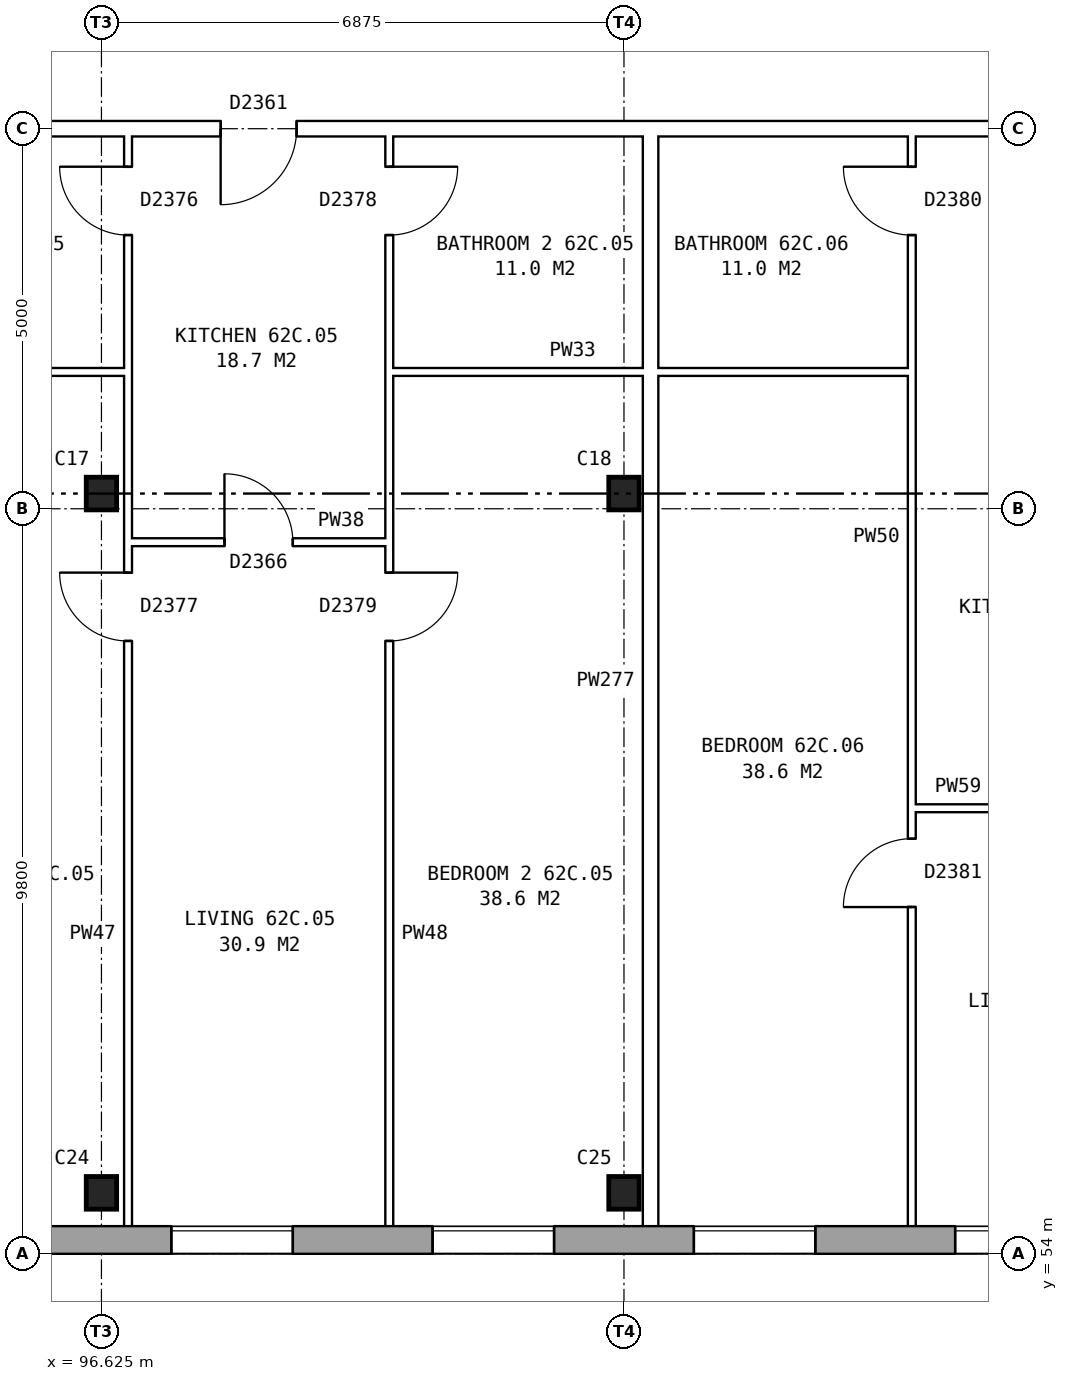
"""IFC4 building model, lengths in metres.
Left out: names, types, materials, properties, quantities, classifications, styles, units other than length and angle.
Written with IfcOpenShell. Run it as: python <this file> out.ifc"""

import sys

from ifc_helpers import new_model, si_unit, direction, frame, frame_2d, origin, origin_2d, place, context, subcontext, project, spatial, rectangle, i_section, extrude, element, fill, save


model = new_model("IFC4")
c1 = context("Model", 3, precision=1e-05, world=origin(), true_north=direction((0.0, 1.0)))
c2 = subcontext(c1, "Body", "Model", "MODEL_VIEW")
j1 = project(units=[si_unit("LENGTHUNIT", "METRE"), si_unit("PLANEANGLEUNIT", "RADIAN")], contexts=[c1])
p1 = place(None, origin())
s1 = spatial("IfcSite", under=j1, at=p1, CompositionType="ELEMENT")
p2 = place(p1, origin())
s2 = spatial("IfcBuilding", under=s1, at=p2, CompositionType="ELEMENT")
p3 = place(p2, frame((0.0, 0.0, 221.4)))
s3 = spatial("IfcBuildingStorey", under=s2, at=p3, CompositionType="ELEMENT", Elevation=221.4)
for number, where, z_axis, x_axis in (
    (1, (96.625, 54.8, 0.0), (0.0, 0.0, 1.0), (1.0, 0.0, 0.0)),
    (2, (103.5, 54.8, 0.0), (0.0, 0.0, 1.0), (1.0, 0.0, 0.0)),
    (3, (96.625, 64.0, 0.0), (0.0, 0.0, 1.0), (1.0, 0.0, 0.0)),
    (4, (103.5, 64.0, 0.0), (0.0, 0.0, 1.0), (1.0, 0.0, 0.0)),
):
    element("IfcColumn", number, at=place(p3, frame(where, z_axis=z_axis, x_axis=x_axis)), inside=s3, PredefinedType="COLUMN", context=c2, shape_type="SweptSolid", body=[
        extrude(i_section(OverallWidth=0.4, OverallDepth=0.43, WebThickness=0.04, FlangeThickness=0.04, at=origin_2d()), origin(), (0.0, 0.0, 1.0), 2.85),
    ])
p4 = place(p3, frame((75.95, 54.18, 0.0), z_axis=(0.0, 0.0, 1.0), x_axis=(1.0, 0.0, 0.0)))
e5 = element("IfcWall", 5, at=p4, inside=s3, PredefinedType="STANDARD", context=c2, shape_type="SweptSolid", body=[
    extrude(rectangle(XDim=55.1, YDim=0.36, at=frame_2d((27.55, 0.0))), origin(), (0.0, 0.0, 1.0), 2.85),
])
p5 = place(p4, frame((0.969, 0.0, 0.8)))
e6 = element("IfcOpeningElement", 6, at=p5, cuts=e5, PredefinedType="OPENING", context=c2, shape_type="SweptSolid", body=[
    extrude(rectangle(XDim=1.6, YDim=1.8, at=frame_2d((0.8, 0.9))), frame((0.0, 0.19, 0.0), z_axis=(0.0, -1.0, 0.0), x_axis=(1.0, 0.0, 0.0)), (0.0, 0.0, 1.0), 0.38),
])
p6 = place(p4, frame((4.406, 0.0, 0.8)))
e7 = element("IfcOpeningElement", 7, at=p6, cuts=e5, PredefinedType="OPENING", context=c2, shape_type="SweptSolid", body=[
    extrude(rectangle(XDim=1.6, YDim=1.8, at=frame_2d((0.8, 0.9))), frame((0.0, 0.19, 0.0), z_axis=(0.0, -1.0, 0.0), x_axis=(1.0, 0.0, 0.0)), (0.0, 0.0, 1.0), 0.38),
])
p7 = place(p4, frame((7.844, 0.0, 0.8)))
e8 = element("IfcOpeningElement", 8, at=p7, cuts=e5, PredefinedType="OPENING", context=c2, shape_type="SweptSolid", body=[
    extrude(rectangle(XDim=1.6, YDim=1.8, at=frame_2d((0.8, 0.9))), frame((0.0, 0.19, 0.0), z_axis=(0.0, -1.0, 0.0), x_axis=(1.0, 0.0, 0.0)), (0.0, 0.0, 1.0), 0.38),
])
p8 = place(p4, frame((11.281, 0.0, 0.8)))
e9 = element("IfcOpeningElement", 9, at=p8, cuts=e5, PredefinedType="OPENING", context=c2, shape_type="SweptSolid", body=[
    extrude(rectangle(XDim=1.6, YDim=1.8, at=frame_2d((0.8, 0.9))), frame((0.0, 0.19, 0.0), z_axis=(0.0, -1.0, 0.0), x_axis=(1.0, 0.0, 0.0)), (0.0, 0.0, 1.0), 0.38),
])
p9 = place(p4, frame((14.719, 0.0, 0.8)))
e10 = element("IfcOpeningElement", 10, at=p9, cuts=e5, PredefinedType="OPENING", context=c2, shape_type="SweptSolid", body=[
    extrude(rectangle(XDim=1.6, YDim=1.8, at=frame_2d((0.8, 0.9))), frame((0.0, 0.19, 0.0), z_axis=(0.0, -1.0, 0.0), x_axis=(1.0, 0.0, 0.0)), (0.0, 0.0, 1.0), 0.38),
])
p10 = place(p4, frame((18.156, 0.0, 0.8)))
e11 = element("IfcOpeningElement", 11, at=p10, cuts=e5, PredefinedType="OPENING", context=c2, shape_type="SweptSolid", body=[
    extrude(rectangle(XDim=1.6, YDim=1.8, at=frame_2d((0.8, 0.9))), frame((0.0, 0.19, 0.0), z_axis=(0.0, -1.0, 0.0), x_axis=(1.0, 0.0, 0.0)), (0.0, 0.0, 1.0), 0.38),
])
p11 = place(p4, frame((21.594, 0.0, 0.8)))
e12 = element("IfcOpeningElement", 12, at=p11, cuts=e5, PredefinedType="OPENING", context=c2, shape_type="SweptSolid", body=[
    extrude(rectangle(XDim=1.6, YDim=1.8, at=frame_2d((0.8, 0.9))), frame((0.0, 0.19, 0.0), z_axis=(0.0, -1.0, 0.0), x_axis=(1.0, 0.0, 0.0)), (0.0, 0.0, 1.0), 0.38),
])
p12 = place(p4, frame((25.031, 0.0, 0.8)))
e13 = element("IfcOpeningElement", 13, at=p12, cuts=e5, PredefinedType="OPENING", context=c2, shape_type="SweptSolid", body=[
    extrude(rectangle(XDim=1.6, YDim=1.8, at=frame_2d((0.8, 0.9))), frame((0.0, 0.19, 0.0), z_axis=(0.0, -1.0, 0.0), x_axis=(1.0, 0.0, 0.0)), (0.0, 0.0, 1.0), 0.38),
])
p13 = place(p4, frame((28.469, 0.0, 0.8)))
e14 = element("IfcOpeningElement", 14, at=p13, cuts=e5, PredefinedType="OPENING", context=c2, shape_type="SweptSolid", body=[
    extrude(rectangle(XDim=1.6, YDim=1.8, at=frame_2d((0.8, 0.9))), frame((0.0, 0.19, 0.0), z_axis=(0.0, -1.0, 0.0), x_axis=(1.0, 0.0, 0.0)), (0.0, 0.0, 1.0), 0.38),
])
p14 = place(p4, frame((31.906, 0.0, 0.8)))
e15 = element("IfcOpeningElement", 15, at=p14, cuts=e5, PredefinedType="OPENING", context=c2, shape_type="SweptSolid", body=[
    extrude(rectangle(XDim=1.6, YDim=1.8, at=frame_2d((0.8, 0.9))), frame((0.0, 0.19, 0.0), z_axis=(0.0, -1.0, 0.0), x_axis=(1.0, 0.0, 0.0)), (0.0, 0.0, 1.0), 0.38),
])
p15 = place(p4, frame((35.344, 0.0, 0.8)))
e16 = element("IfcOpeningElement", 16, at=p15, cuts=e5, PredefinedType="OPENING", context=c2, shape_type="SweptSolid", body=[
    extrude(rectangle(XDim=1.6, YDim=1.8, at=frame_2d((0.8, 0.9))), frame((0.0, 0.19, 0.0), z_axis=(0.0, -1.0, 0.0), x_axis=(1.0, 0.0, 0.0)), (0.0, 0.0, 1.0), 0.38),
])
p16 = place(p4, frame((38.781, 0.0, 0.8)))
e17 = element("IfcOpeningElement", 17, at=p16, cuts=e5, PredefinedType="OPENING", context=c2, shape_type="SweptSolid", body=[
    extrude(rectangle(XDim=1.6, YDim=1.8, at=frame_2d((0.8, 0.9))), frame((0.0, 0.19, 0.0), z_axis=(0.0, -1.0, 0.0), x_axis=(1.0, 0.0, 0.0)), (0.0, 0.0, 1.0), 0.38),
])
p17 = place(p4, frame((42.219, 0.0, 0.8)))
e18 = element("IfcOpeningElement", 18, at=p17, cuts=e5, PredefinedType="OPENING", context=c2, shape_type="SweptSolid", body=[
    extrude(rectangle(XDim=1.6, YDim=1.8, at=frame_2d((0.8, 0.9))), frame((0.0, 0.19, 0.0), z_axis=(0.0, -1.0, 0.0), x_axis=(1.0, 0.0, 0.0)), (0.0, 0.0, 1.0), 0.38),
])
p18 = place(p4, frame((45.656, 0.0, 0.8)))
e19 = element("IfcOpeningElement", 19, at=p18, cuts=e5, PredefinedType="OPENING", context=c2, shape_type="SweptSolid", body=[
    extrude(rectangle(XDim=1.6, YDim=1.8, at=frame_2d((0.8, 0.9))), frame((0.0, 0.19, 0.0), z_axis=(0.0, -1.0, 0.0), x_axis=(1.0, 0.0, 0.0)), (0.0, 0.0, 1.0), 0.38),
])
p19 = place(p4, frame((49.094, 0.0, 0.8)))
e20 = element("IfcOpeningElement", 20, at=p19, cuts=e5, PredefinedType="OPENING", context=c2, shape_type="SweptSolid", body=[
    extrude(rectangle(XDim=1.6, YDim=1.8, at=frame_2d((0.8, 0.9))), frame((0.0, 0.19, 0.0), z_axis=(0.0, -1.0, 0.0), x_axis=(1.0, 0.0, 0.0)), (0.0, 0.0, 1.0), 0.38),
])
p20 = place(p4, frame((52.531, 0.0, 0.8)))
e21 = element("IfcOpeningElement", 21, at=p20, cuts=e5, PredefinedType="OPENING", context=c2, shape_type="SweptSolid", body=[
    extrude(rectangle(XDim=1.6, YDim=1.8, at=frame_2d((0.8, 0.9))), frame((0.0, 0.19, 0.0), z_axis=(0.0, -1.0, 0.0), x_axis=(1.0, 0.0, 0.0)), (0.0, 0.0, 1.0), 0.38),
])
p21 = place(p3, frame((107.287, 59.86, 0.0), z_axis=(0.0, 0.0, 1.0), x_axis=(1.0, 0.0, 0.0)))
e22 = element("IfcWall", 22, at=p21, inside=s3, PredefinedType="PARTITIONING", context=c2, shape_type="SweptSolid", body=[
    extrude(rectangle(XDim=3.338, YDim=0.1, at=frame_2d((1.669, 0.0))), origin(), (0.0, 0.0, 1.0), 2.85),
])
p22 = place(p21, frame((1.219, 0.0, 0.0)))
e23 = element("IfcOpeningElement", 23, at=p22, cuts=e22, PredefinedType="OPENING", context=c2, shape_type="SweptSolid", body=[
    extrude(rectangle(XDim=0.9, YDim=2.1, at=frame_2d((0.45, 1.05))), frame((0.0, 0.06, 0.0), z_axis=(0.0, -1.0, 0.0), x_axis=(1.0, 0.0, 0.0)), (0.0, 0.0, 1.0), 0.12),
])
p23 = place(p3, frame((96.975, 63.36, 0.0), z_axis=(0.0, 0.0, 1.0), x_axis=(1.0, 0.0, 0.0)))
e24 = element("IfcWall", 24, at=p23, inside=s3, PredefinedType="PARTITIONING", context=c2, shape_type="SweptSolid", body=[
    extrude(rectangle(XDim=3.437, YDim=0.1, at=frame_2d((1.719, 0.0))), origin(), (0.0, 0.0, 1.0), 2.85),
])
p24 = place(p23, frame((1.269, 0.0, 0.0)))
e25 = element("IfcOpeningElement", 25, at=p24, cuts=e24, PredefinedType="OPENING", context=c2, shape_type="SweptSolid", body=[
    extrude(rectangle(XDim=0.9, YDim=2.1, at=frame_2d((0.45, 1.05))), frame((0.0, 0.06, 0.0), z_axis=(0.0, -1.0, 0.0), x_axis=(1.0, 0.0, 0.0)), (0.0, 0.0, 1.0), 0.12),
])
for number, where, z_axis, x_axis in (
    (26, (90.1, 65.6, 0.0), (0.0, 0.0, 1.0), (1.0, 0.0, 0.0)),
    (27, (100.412, 65.6, 0.0), (0.0, 0.0, 1.0), (1.0, 0.0, 0.0)),
):
    element("IfcWall", number, at=place(p3, frame(where, z_axis=z_axis, x_axis=x_axis)), inside=s3, PredefinedType="PARTITIONING", context=c2, shape_type="SweptSolid", body=[
        extrude(rectangle(XDim=6.875, YDim=0.1, at=frame_2d((3.438, 0.0))), origin(), (0.0, 0.0, 1.0), 2.85),
    ])
p25 = place(p3, frame((75.64, 68.8, 0.0), z_axis=(0.0, 0.0, 1.0), x_axis=(1.0, 0.0, 0.0)))
e28 = element("IfcWall", 28, at=p25, inside=s3, PredefinedType="PARTITIONING", context=c2, shape_type="SweptSolid", body=[
    extrude(rectangle(XDim=55.72, YDim=0.2, at=frame_2d((27.86, 0.0))), origin(), (0.0, 0.0, 1.0), 2.85),
])
p26 = place(p25, frame((1.399, 0.0, 0.0)))
e29 = element("IfcOpeningElement", 29, at=p26, cuts=e28, PredefinedType="OPENING", context=c2, shape_type="SweptSolid", body=[
    extrude(rectangle(XDim=1.0, YDim=2.1, at=frame_2d((0.5, 1.05))), frame((0.0, 0.11, 0.0), z_axis=(0.0, -1.0, 0.0), x_axis=(1.0, 0.0, 0.0)), (0.0, 0.0, 1.0), 0.22),
])
p27 = place(p25, frame((12.241, 0.0, 0.0)))
e30 = element("IfcOpeningElement", 30, at=p27, cuts=e28, PredefinedType="OPENING", context=c2, shape_type="SweptSolid", body=[
    extrude(rectangle(XDim=1.0, YDim=2.1, at=frame_2d((0.5, 1.05))), frame((0.0, 0.11, 0.0), z_axis=(0.0, -1.0, 0.0), x_axis=(1.0, 0.0, 0.0)), (0.0, 0.0, 1.0), 0.22),
])
p28 = place(p25, frame((22.553, 0.0, 0.0)))
e31 = element("IfcOpeningElement", 31, at=p28, cuts=e28, PredefinedType="OPENING", context=c2, shape_type="SweptSolid", body=[
    extrude(rectangle(XDim=1.0, YDim=2.1, at=frame_2d((0.5, 1.05))), frame((0.0, 0.11, 0.0), z_axis=(0.0, -1.0, 0.0), x_axis=(1.0, 0.0, 0.0)), (0.0, 0.0, 1.0), 0.22),
])
p29 = place(p25, frame((32.866, 0.0, 0.0)))
e32 = element("IfcOpeningElement", 32, at=p29, cuts=e28, PredefinedType="OPENING", context=c2, shape_type="SweptSolid", body=[
    extrude(rectangle(XDim=1.0, YDim=2.1, at=frame_2d((0.5, 1.05))), frame((0.0, 0.11, 0.0), z_axis=(0.0, -1.0, 0.0), x_axis=(1.0, 0.0, 0.0)), (0.0, 0.0, 1.0), 0.22),
])
p30 = place(p25, frame((36.303, 0.0, 0.0)))
e33 = element("IfcOpeningElement", 33, at=p30, cuts=e28, PredefinedType="OPENING", context=c2, shape_type="SweptSolid", body=[
    extrude(rectangle(XDim=1.0, YDim=2.1, at=frame_2d((0.5, 1.05))), frame((0.0, 0.11, 0.0), z_axis=(0.0, -1.0, 0.0), x_axis=(1.0, 0.0, 0.0)), (0.0, 0.0, 1.0), 0.22),
])
p31 = place(p25, frame((46.616, 0.0, 0.0)))
e34 = element("IfcOpeningElement", 34, at=p31, cuts=e28, PredefinedType="OPENING", context=c2, shape_type="SweptSolid", body=[
    extrude(rectangle(XDim=1.0, YDim=2.1, at=frame_2d((0.5, 1.05))), frame((0.0, 0.11, 0.0), z_axis=(0.0, -1.0, 0.0), x_axis=(1.0, 0.0, 0.0)), (0.0, 0.0, 1.0), 0.22),
])
p32 = place(p25, frame((50.053, 0.0, 0.0)))
e35 = element("IfcOpeningElement", 35, at=p32, cuts=e28, PredefinedType="OPENING", context=c2, shape_type="SweptSolid", body=[
    extrude(rectangle(XDim=1.0, YDim=2.1, at=frame_2d((0.5, 1.05))), frame((0.0, 0.11, 0.0), z_axis=(0.0, -1.0, 0.0), x_axis=(1.0, 0.0, 0.0)), (0.0, 0.0, 1.0), 0.22),
])
p33 = place(p3, frame((96.975, 54.36, 0.0), z_axis=(0.0, 0.0, 1.0), x_axis=(0.0, 1.0, 0.0)))
e36 = element("IfcWall", 36, at=p33, inside=s3, PredefinedType="PARTITIONING", context=c2, shape_type="SweptSolid", body=[
    extrude(rectangle(XDim=14.34, YDim=0.1, at=frame_2d((7.17, 0.0))), origin(), (0.0, 0.0, 1.0), 2.85),
])
p34 = place(p33, frame((7.7, 0.0, 0.0)))
e37 = element("IfcOpeningElement", 37, at=p34, cuts=e36, PredefinedType="OPENING", context=c2, shape_type="SweptSolid", body=[
    extrude(rectangle(XDim=0.9, YDim=2.1, at=frame_2d((0.45, 1.05))), frame((0.0, 0.06, 0.0), z_axis=(0.0, -1.0, 0.0), x_axis=(1.0, 0.0, 0.0)), (0.0, 0.0, 1.0), 0.12),
])
p35 = place(p33, frame((13.04, 0.0, 0.0)))
e38 = element("IfcOpeningElement", 38, at=p35, cuts=e36, PredefinedType="OPENING", context=c2, shape_type="SweptSolid", body=[
    extrude(rectangle(XDim=0.9, YDim=2.1, at=frame_2d((0.45, 1.05))), frame((0.0, 0.06, 0.0), z_axis=(0.0, -1.0, 0.0), x_axis=(1.0, 0.0, 0.0)), (0.0, 0.0, 1.0), 0.12),
])
p36 = place(p3, frame((100.412, 54.36, 0.0), z_axis=(0.0, 0.0, 1.0), x_axis=(0.0, 1.0, 0.0)))
e39 = element("IfcWall", 39, at=p36, inside=s3, PredefinedType="PARTITIONING", context=c2, shape_type="SweptSolid", body=[
    extrude(rectangle(XDim=14.34, YDim=0.1, at=frame_2d((7.17, 0.0))), origin(), (0.0, 0.0, 1.0), 2.85),
])
p37 = place(p36, frame((7.7, 0.0, 0.0)))
e40 = element("IfcOpeningElement", 40, at=p37, cuts=e39, PredefinedType="OPENING", context=c2, shape_type="SweptSolid", body=[
    extrude(rectangle(XDim=0.9, YDim=2.1, at=frame_2d((0.45, 1.05))), frame((0.0, 0.06, 0.0), z_axis=(0.0, -1.0, 0.0), x_axis=(1.0, 0.0, 0.0)), (0.0, 0.0, 1.0), 0.12),
])
p38 = place(p36, frame((13.04, 0.0, 0.0)))
e41 = element("IfcOpeningElement", 41, at=p38, cuts=e39, PredefinedType="OPENING", context=c2, shape_type="SweptSolid", body=[
    extrude(rectangle(XDim=0.9, YDim=2.1, at=frame_2d((0.45, 1.05))), frame((0.0, 0.06, 0.0), z_axis=(0.0, -1.0, 0.0), x_axis=(1.0, 0.0, 0.0)), (0.0, 0.0, 1.0), 0.12),
])
p39 = place(p3, frame((103.85, 54.36, 0.0), z_axis=(0.0, 0.0, 1.0), x_axis=(0.0, 1.0, 0.0)))
e42 = element("IfcWall", 42, at=p39, inside=s3, PredefinedType="PARTITIONING", context=c2, shape_type="SweptSolid", body=[
    extrude(rectangle(XDim=14.34, YDim=0.2, at=frame_2d((7.17, 0.0))), origin(), (0.0, 0.0, 1.0), 2.85),
])
p40 = place(p3, frame((107.287, 54.36, 0.0), z_axis=(0.0, 0.0, 1.0), x_axis=(0.0, 1.0, 0.0)))
e43 = element("IfcWall", 43, at=p40, inside=s3, PredefinedType="PARTITIONING", context=c2, shape_type="SweptSolid", body=[
    extrude(rectangle(XDim=14.34, YDim=0.1, at=frame_2d((7.17, 0.0))), origin(), (0.0, 0.0, 1.0), 2.85),
])
p41 = place(p40, frame((4.2, 0.0, 0.0)))
e44 = element("IfcOpeningElement", 44, at=p41, cuts=e43, PredefinedType="OPENING", context=c2, shape_type="SweptSolid", body=[
    extrude(rectangle(XDim=0.9, YDim=2.1, at=frame_2d((0.45, 1.05))), frame((0.0, 0.06, 0.0), z_axis=(0.0, -1.0, 0.0), x_axis=(1.0, 0.0, 0.0)), (0.0, 0.0, 1.0), 0.12),
])
p42 = place(p40, frame((13.04, 0.0, 0.0)))
e45 = element("IfcOpeningElement", 45, at=p42, cuts=e43, PredefinedType="OPENING", context=c2, shape_type="SweptSolid", body=[
    extrude(rectangle(XDim=0.9, YDim=2.1, at=frame_2d((0.45, 1.05))), frame((0.0, 0.06, 0.0), z_axis=(0.0, -1.0, 0.0), x_axis=(1.0, 0.0, 0.0)), (0.0, 0.0, 1.0), 0.12),
])
p43 = place(p11, origin())
e46 = element("IfcWindow", 46, at=p43, inside=s3, PartitioningType="SINGLE_PANEL", PredefinedType="WINDOW", context=c2, shape_type="SweptSolid", body=[
    extrude(rectangle(XDim=1.6, YDim=1.8, at=frame_2d((0.8, 0.9))), frame((0.0, 0.15, 0.0), z_axis=(0.0, -1.0, 0.0), x_axis=(1.0, 0.0, 0.0)), (0.0, 0.0, 1.0), 0.06),
])
fill(e12, e46)
p44 = place(p12, origin())
e47 = element("IfcWindow", 47, at=p44, inside=s3, PartitioningType="SINGLE_PANEL", PredefinedType="WINDOW", context=c2, shape_type="SweptSolid", body=[
    extrude(rectangle(XDim=1.6, YDim=1.8, at=frame_2d((0.8, 0.9))), frame((0.0, 0.15, 0.0), z_axis=(0.0, -1.0, 0.0), x_axis=(1.0, 0.0, 0.0)), (0.0, 0.0, 1.0), 0.06),
])
fill(e13, e47)
p45 = place(p13, origin())
e48 = element("IfcWindow", 48, at=p45, inside=s3, PartitioningType="SINGLE_PANEL", PredefinedType="WINDOW", context=c2, shape_type="SweptSolid", body=[
    extrude(rectangle(XDim=1.6, YDim=1.8, at=frame_2d((0.8, 0.9))), frame((0.0, 0.15, 0.0), z_axis=(0.0, -1.0, 0.0), x_axis=(1.0, 0.0, 0.0)), (0.0, 0.0, 1.0), 0.06),
])
fill(e14, e48)
p46 = place(p14, origin())
e49 = element("IfcWindow", 49, at=p46, inside=s3, PartitioningType="SINGLE_PANEL", PredefinedType="WINDOW", context=c2, shape_type="SweptSolid", body=[
    extrude(rectangle(XDim=1.6, YDim=1.8, at=frame_2d((0.8, 0.9))), frame((0.0, 0.15, 0.0), z_axis=(0.0, -1.0, 0.0), x_axis=(1.0, 0.0, 0.0)), (0.0, 0.0, 1.0), 0.06),
])
fill(e15, e49)
p47 = place(p34, origin())
e50 = element("IfcDoor", 50, at=p47, inside=s3, OperationType="SINGLE_SWING_RIGHT", PredefinedType="DOOR", context=c2, shape_type="SweptSolid", body=[
    extrude(rectangle(XDim=0.9, YDim=2.1, at=frame_2d((0.45, 1.05))), frame((0.0, 0.025, 0.0), z_axis=(0.0, -1.0, 0.0), x_axis=(1.0, 0.0, 0.0)), (0.0, 0.0, 1.0), 0.05),
])
fill(e37, e50)
p48 = place(p37, frame((0.9, 0.0, 0.0), z_axis=(0.0, 0.0, 1.0), x_axis=(-1.0, 0.0, 0.0)))
e51 = element("IfcDoor", 51, at=p48, inside=s3, OperationType="SINGLE_SWING_LEFT", PredefinedType="DOOR", context=c2, shape_type="SweptSolid", body=[
    extrude(rectangle(XDim=0.9, YDim=2.1, at=frame_2d((0.45, 1.05))), frame((0.0, 0.025, 0.0), z_axis=(0.0, -1.0, 0.0), x_axis=(1.0, 0.0, 0.0)), (0.0, 0.0, 1.0), 0.05),
])
fill(e40, e51)
p49 = place(p28, frame((1.0, 0.0, 0.0), z_axis=(0.0, 0.0, 1.0), x_axis=(-1.0, 0.0, 0.0)))
e52 = element("IfcDoor", 52, at=p49, inside=s3, OperationType="SINGLE_SWING_RIGHT", PredefinedType="DOOR", context=c2, shape_type="SweptSolid", body=[
    extrude(rectangle(XDim=1.0, YDim=2.1, at=frame_2d((0.5, 1.05))), frame((0.0, 0.025, 0.0), z_axis=(0.0, -1.0, 0.0), x_axis=(1.0, 0.0, 0.0)), (0.0, 0.0, 1.0), 0.05),
])
fill(e31, e52)
p50 = place(p24, origin())
e53 = element("IfcDoor", 53, at=p50, inside=s3, OperationType="SINGLE_SWING_LEFT", PredefinedType="DOOR", context=c2, shape_type="SweptSolid", body=[
    extrude(rectangle(XDim=0.9, YDim=2.1, at=frame_2d((0.45, 1.05))), frame((0.0, 0.025, 0.0), z_axis=(0.0, -1.0, 0.0), x_axis=(1.0, 0.0, 0.0)), (0.0, 0.0, 1.0), 0.05),
])
fill(e25, e53)
p51 = place(p35, origin())
e54 = element("IfcDoor", 54, at=p51, inside=s3, OperationType="SINGLE_SWING_RIGHT", PredefinedType="DOOR", context=c2, shape_type="SweptSolid", body=[
    extrude(rectangle(XDim=0.9, YDim=2.1, at=frame_2d((0.45, 1.05))), frame((0.0, 0.025, 0.0), z_axis=(0.0, -1.0, 0.0), x_axis=(1.0, 0.0, 0.0)), (0.0, 0.0, 1.0), 0.05),
])
fill(e38, e54)
p52 = place(p38, frame((0.9, 0.0, 0.0), z_axis=(0.0, 0.0, 1.0), x_axis=(-1.0, 0.0, 0.0)))
e55 = element("IfcDoor", 55, at=p52, inside=s3, OperationType="SINGLE_SWING_LEFT", PredefinedType="DOOR", context=c2, shape_type="SweptSolid", body=[
    extrude(rectangle(XDim=0.9, YDim=2.1, at=frame_2d((0.45, 1.05))), frame((0.0, 0.025, 0.0), z_axis=(0.0, -1.0, 0.0), x_axis=(1.0, 0.0, 0.0)), (0.0, 0.0, 1.0), 0.05),
])
fill(e41, e55)
p53 = place(p41, origin())
e56 = element("IfcDoor", 56, at=p53, inside=s3, OperationType="SINGLE_SWING_LEFT", PredefinedType="DOOR", context=c2, shape_type="SweptSolid", body=[
    extrude(rectangle(XDim=0.9, YDim=2.1, at=frame_2d((0.45, 1.05))), frame((0.0, 0.025, 0.0), z_axis=(0.0, -1.0, 0.0), x_axis=(1.0, 0.0, 0.0)), (0.0, 0.0, 1.0), 0.05),
])
fill(e44, e56)
p54 = place(p42, origin())
e57 = element("IfcDoor", 57, at=p54, inside=s3, OperationType="SINGLE_SWING_RIGHT", PredefinedType="DOOR", context=c2, shape_type="SweptSolid", body=[
    extrude(rectangle(XDim=0.9, YDim=2.1, at=frame_2d((0.45, 1.05))), frame((0.0, 0.025, 0.0), z_axis=(0.0, -1.0, 0.0), x_axis=(1.0, 0.0, 0.0)), (0.0, 0.0, 1.0), 0.05),
])
fill(e45, e57)
save(model, sys.argv[1])
